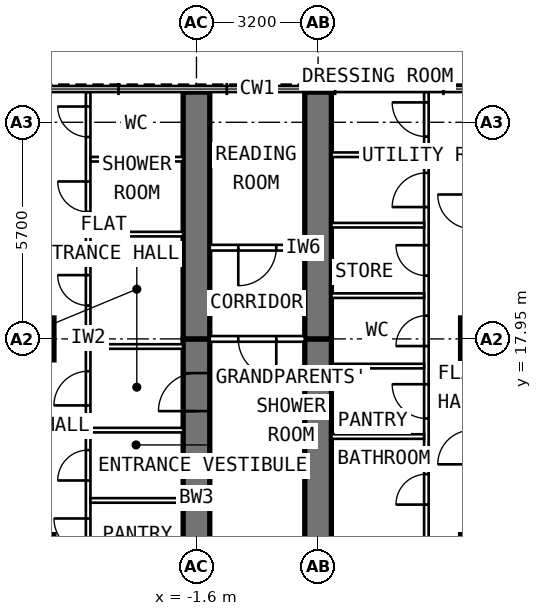
"""IFC4 building model, lengths in metres.
Left out: names, types, materials, properties, quantities, classifications, styles, units other than length and angle.
Written with IfcOpenShell. Run it as: python <this file> out.ifc"""

import sys

from ifc_helpers import new_model, si_unit, direction, frame, frame_2d, origin, origin_2d, place, context, subcontext, project, spatial, rectangle, extrude, element, fill, save


model = new_model("IFC4")
c1 = context("Model", 3, precision=1e-05, world=origin(), true_north=direction((0.0, 1.0)))
c2 = subcontext(c1, "Body", "Model", "MODEL_VIEW")
j1 = project(units=[si_unit("LENGTHUNIT", "METRE"), si_unit("PLANEANGLEUNIT", "RADIAN")], contexts=[c1])
p1 = place(None, origin())
s1 = spatial("IfcSite", under=j1, at=p1, CompositionType="ELEMENT")
p2 = place(p1, origin())
s2 = spatial("IfcBuilding", under=s1, at=p2, CompositionType="ELEMENT")
p3 = place(p2, frame((0.0, 0.0, 242.4)))
s3 = spatial("IfcBuildingStorey", under=s2, at=p3, CompositionType="ELEMENT", Elevation=242.4)
for number, where, z_axis, x_axis in (
    (1, (-5.9, 12.25, 0.0), (0.0, 0.0, 1.0), (0.0, 1.0, 0.0)),
    (2, (-5.9, 17.95, 0.0), (0.0, 0.0, 1.0), (0.0, 1.0, 0.0)),
    (3, (5.9, 12.25, 0.0), (0.0, 0.0, 1.0), (0.0, 1.0, 0.0)),
    (4, (5.9, 17.95, 0.0), (0.0, 0.0, 1.0), (0.0, 1.0, 0.0)),
):
    element("IfcColumn", number, at=place(p3, frame(where, z_axis=z_axis, x_axis=x_axis)), inside=s3, PredefinedType="COLUMN", context=c2, shape_type="SweptSolid", body=[
        extrude(rectangle(XDim=1.1, YDim=1.1, at=origin_2d()), origin(), (0.0, 0.0, 1.0), 3.6),
    ])
p4 = place(p3, frame((-1.6, 9.6, 0.0), z_axis=(0.0, 0.0, 1.0), x_axis=(0.0, 1.0, 0.0)))
e5 = element("IfcWall", 5, at=p4, inside=s3, PredefinedType="SHEAR", context=c2, shape_type="SweptSolid", body=[
    extrude(rectangle(XDim=8.35, YDim=0.7, at=frame_2d((4.175, 0.0))), origin(), (0.0, 0.0, 1.0), 3.6),
])
p5 = place(p4, frame((6.45, 0.0, 0.0)))
e6 = element("IfcOpeningElement", 6, at=p5, cuts=e5, PredefinedType="OPENING", context=c2, shape_type="SweptSolid", body=[
    extrude(rectangle(XDim=1.0, YDim=2.1, at=frame_2d((0.5, 1.05))), frame((0.0, 0.362, 0.0), z_axis=(0.0, -1.0, 0.0), x_axis=(1.0, 0.0, 0.0)), (0.0, 0.0, 1.0), 0.724),
])
p6 = place(p3, frame((-1.6, 17.95, 0.0), z_axis=(0.0, 0.0, 1.0), x_axis=(0.0, 1.0, 0.0)))
e7 = element("IfcWall", 7, at=p6, inside=s3, PredefinedType="SHEAR", context=c2, shape_type="SweptSolid", body=[
    extrude(rectangle(XDim=6.495, YDim=0.7, at=frame_2d((3.248, 0.0))), origin(), (0.0, 0.0, 1.0), 3.6),
])
p7 = place(p3, frame((1.6, 9.6, 0.0), z_axis=(0.0, 0.0, 1.0), x_axis=(0.0, 1.0, 0.0)))
e8 = element("IfcWall", 8, at=p7, inside=s3, PredefinedType="SHEAR", context=c2, shape_type="SweptSolid", body=[
    extrude(rectangle(XDim=8.35, YDim=0.7, at=frame_2d((4.175, 0.0))), origin(), (0.0, 0.0, 1.0), 3.6),
])
p8 = place(p7, frame((1.3, 0.0, 0.0)))
e9 = element("IfcOpeningElement", 9, at=p8, cuts=e8, PredefinedType="OPENING", context=c2, shape_type="SweptSolid", body=[
    extrude(rectangle(XDim=1.0, YDim=2.1, at=frame_2d((0.5, 1.05))), frame((0.0, 0.362, 0.0), z_axis=(0.0, -1.0, 0.0), x_axis=(1.0, 0.0, 0.0)), (0.0, 0.0, 1.0), 0.724),
])
p9 = place(p3, frame((1.6, 17.95, 0.0), z_axis=(0.0, 0.0, 1.0), x_axis=(0.0, 1.0, 0.0)))
e10 = element("IfcWall", 10, at=p9, inside=s3, PredefinedType="SHEAR", context=c2, shape_type="SweptSolid", body=[
    extrude(rectangle(XDim=6.495, YDim=0.7, at=frame_2d((3.248, 0.0))), origin(), (0.0, 0.0, 1.0), 3.6),
])
p10 = place(p3, frame((-4.45, 9.9, 0.0), z_axis=(0.0, 0.0, 1.0), x_axis=(0.0, 1.0, 0.0)))
e11 = element("IfcWall", 11, at=p10, inside=s3, PredefinedType="PARTITIONING", context=c2, shape_type="SweptSolid", body=[
    extrude(rectangle(XDim=14.545, YDim=0.12, at=frame_2d((7.272, 0.0))), origin(), (0.0, 0.0, 1.0), 3.35),
])
p11 = place(p10, frame((0.625, 0.0, 0.0)))
e12 = element("IfcOpeningElement", 12, at=p11, cuts=e11, PredefinedType="OPENING", context=c2, shape_type="SweptSolid", body=[
    extrude(rectangle(XDim=0.8, YDim=2.1, at=frame_2d((0.4, 1.05))), frame((0.0, 0.072, 0.0), z_axis=(0.0, -1.0, 0.0), x_axis=(1.0, 0.0, 0.0)), (0.0, 0.0, 1.0), 0.144),
])
p12 = place(p10, frame((2.425, 0.0, 0.0)))
e13 = element("IfcOpeningElement", 13, at=p12, cuts=e11, PredefinedType="OPENING", context=c2, shape_type="SweptSolid", body=[
    extrude(rectangle(XDim=0.9, YDim=2.1, at=frame_2d((0.45, 1.05))), frame((0.0, 0.072, 0.0), z_axis=(0.0, -1.0, 0.0), x_axis=(1.0, 0.0, 0.0)), (0.0, 0.0, 1.0), 0.144),
])
p13 = place(p10, frame((4.325, 0.0, 0.0)))
e14 = element("IfcOpeningElement", 14, at=p13, cuts=e11, PredefinedType="OPENING", context=c2, shape_type="SweptSolid", body=[
    extrude(rectangle(XDim=0.8, YDim=2.1, at=frame_2d((0.4, 1.05))), frame((0.0, 0.072, 0.0), z_axis=(0.0, -1.0, 0.0), x_axis=(1.0, 0.0, 0.0)), (0.0, 0.0, 1.0), 0.144),
])
p14 = place(p10, frame((6.3, 0.0, 0.0)))
e15 = element("IfcOpeningElement", 15, at=p14, cuts=e11, PredefinedType="OPENING", context=c2, shape_type="SweptSolid", body=[
    extrude(rectangle(XDim=0.9, YDim=2.1, at=frame_2d((0.45, 1.05))), frame((0.0, 0.072, 0.0), z_axis=(0.0, -1.0, 0.0), x_axis=(1.0, 0.0, 0.0)), (0.0, 0.0, 1.0), 0.144),
])
p15 = place(p10, frame((8.928, 0.0, 0.0)))
e16 = element("IfcOpeningElement", 16, at=p15, cuts=e11, PredefinedType="OPENING", context=c2, shape_type="SweptSolid", body=[
    extrude(rectangle(XDim=0.8, YDim=2.1, at=frame_2d((0.4, 1.05))), frame((0.0, 0.072, 0.0), z_axis=(0.0, -1.0, 0.0), x_axis=(1.0, 0.0, 0.0)), (0.0, 0.0, 1.0), 0.144),
])
p16 = place(p10, frame((11.393, 0.0, 0.0)))
e17 = element("IfcOpeningElement", 17, at=p16, cuts=e11, PredefinedType="OPENING", context=c2, shape_type="SweptSolid", body=[
    extrude(rectangle(XDim=0.8, YDim=2.1, at=frame_2d((0.4, 1.05))), frame((0.0, 0.072, 0.0), z_axis=(0.0, -1.0, 0.0), x_axis=(1.0, 0.0, 0.0)), (0.0, 0.0, 1.0), 0.144),
])
p17 = place(p10, frame((13.364, 0.0, 0.0)))
e18 = element("IfcOpeningElement", 18, at=p17, cuts=e11, PredefinedType="OPENING", context=c2, shape_type="SweptSolid", body=[
    extrude(rectangle(XDim=0.8, YDim=2.1, at=frame_2d((0.4, 1.05))), frame((0.0, 0.072, 0.0), z_axis=(0.0, -1.0, 0.0), x_axis=(1.0, 0.0, 0.0)), (0.0, 0.0, 1.0), 0.144),
])
for number, where, z_axis, x_axis in (
    (19, (-1.95, 13.7, 0.0), (0.0, 0.0, 1.0), (-1.0, 0.0, 0.0)),
    (20, (-1.95, 15.55, 0.0), (0.0, 0.0, 1.0), (-1.0, 0.0, 0.0)),
):
    element("IfcWall", number, at=place(p3, frame(where, z_axis=z_axis, x_axis=x_axis)), inside=s3, PredefinedType="PARTITIONING", context=c2, shape_type="SweptSolid", body=[
        extrude(rectangle(XDim=2.44, YDim=0.12, at=frame_2d((1.22, 0.0))), origin(), (0.0, 0.0, 1.0), 3.35),
    ])
p18 = place(p3, frame((-1.95, 17.75, 0.0), z_axis=(0.0, 0.0, 1.0), x_axis=(-1.0, 0.0, 0.0)))
e21 = element("IfcWall", 21, at=p18, inside=s3, PredefinedType="PARTITIONING", context=c2, shape_type="SweptSolid", body=[
    extrude(rectangle(XDim=2.44, YDim=0.12, at=frame_2d((1.22, 0.0))), origin(), (0.0, 0.0, 1.0), 2.45),
])
for number, where, z_axis, x_axis in (
    (22, (-1.95, 20.707, 0.0), (0.0, 0.0, 1.0), (-1.0, 0.0, 0.0)),
    (23, (-1.95, 22.678, 0.0), (0.0, 0.0, 1.0), (-1.0, 0.0, 0.0)),
):
    element("IfcWall", number, at=place(p3, frame(where, z_axis=z_axis, x_axis=x_axis)), inside=s3, PredefinedType="PARTITIONING", context=c2, shape_type="SweptSolid", body=[
        extrude(rectangle(XDim=2.44, YDim=0.12, at=frame_2d((1.22, 0.0))), origin(), (0.0, 0.0, 1.0), 3.35),
    ])
p19 = place(p3, frame((4.45, 9.9, 0.0), z_axis=(0.0, 0.0, 1.0), x_axis=(0.0, 1.0, 0.0)))
e24 = element("IfcWall", 24, at=p19, inside=s3, PredefinedType="PARTITIONING", context=c2, shape_type="SweptSolid", body=[
    extrude(rectangle(XDim=14.545, YDim=0.12, at=frame_2d((7.272, 0.0))), origin(), (0.0, 0.0, 1.0), 3.35),
])
p20 = place(p19, frame((0.95, 0.0, 0.0)))
e25 = element("IfcOpeningElement", 25, at=p20, cuts=e24, PredefinedType="OPENING", context=c2, shape_type="SweptSolid", body=[
    extrude(rectangle(XDim=0.9, YDim=2.1, at=frame_2d((0.45, 1.05))), frame((0.0, 0.072, 0.0), z_axis=(0.0, -1.0, 0.0), x_axis=(1.0, 0.0, 0.0)), (0.0, 0.0, 1.0), 0.144),
])
p21 = place(p19, frame((3.69, 0.0, 0.0)))
e26 = element("IfcOpeningElement", 26, at=p21, cuts=e24, PredefinedType="OPENING", context=c2, shape_type="SweptSolid", body=[
    extrude(rectangle(XDim=0.8, YDim=2.1, at=frame_2d((0.4, 1.05))), frame((0.0, 0.072, 0.0), z_axis=(0.0, -1.0, 0.0), x_axis=(1.0, 0.0, 0.0)), (0.0, 0.0, 1.0), 0.144),
])
p22 = place(p19, frame((5.958, 0.0, 0.0)))
e27 = element("IfcOpeningElement", 27, at=p22, cuts=e24, PredefinedType="OPENING", context=c2, shape_type="SweptSolid", body=[
    extrude(rectangle(XDim=0.9, YDim=2.1, at=frame_2d((0.45, 1.05))), frame((0.0, 0.072, 0.0), z_axis=(0.0, -1.0, 0.0), x_axis=(1.0, 0.0, 0.0)), (0.0, 0.0, 1.0), 0.144),
])
p23 = place(p19, frame((7.862, 0.0, 0.0)))
e28 = element("IfcOpeningElement", 28, at=p23, cuts=e24, PredefinedType="OPENING", context=c2, shape_type="SweptSolid", body=[
    extrude(rectangle(XDim=0.8, YDim=2.1, at=frame_2d((0.4, 1.05))), frame((0.0, 0.072, 0.0), z_axis=(0.0, -1.0, 0.0), x_axis=(1.0, 0.0, 0.0)), (0.0, 0.0, 1.0), 0.144),
])
p24 = place(p19, frame((9.715, 0.0, 0.0)))
e29 = element("IfcOpeningElement", 29, at=p24, cuts=e24, PredefinedType="OPENING", context=c2, shape_type="SweptSolid", body=[
    extrude(rectangle(XDim=0.8, YDim=2.1, at=frame_2d((0.4, 1.05))), frame((0.0, 0.072, 0.0), z_axis=(0.0, -1.0, 0.0), x_axis=(1.0, 0.0, 0.0)), (0.0, 0.0, 1.0), 0.144),
])
p25 = place(p19, frame((11.519, 0.0, 0.0)))
e30 = element("IfcOpeningElement", 30, at=p25, cuts=e24, PredefinedType="OPENING", context=c2, shape_type="SweptSolid", body=[
    extrude(rectangle(XDim=0.9, YDim=2.1, at=frame_2d((0.45, 1.05))), frame((0.0, 0.072, 0.0), z_axis=(0.0, -1.0, 0.0), x_axis=(1.0, 0.0, 0.0)), (0.0, 0.0, 1.0), 0.144),
])
p26 = place(p19, frame((13.373, 0.0, 0.0)))
e31 = element("IfcOpeningElement", 31, at=p26, cuts=e24, PredefinedType="OPENING", context=c2, shape_type="SweptSolid", body=[
    extrude(rectangle(XDim=0.9, YDim=2.1, at=frame_2d((0.45, 1.05))), frame((0.0, 0.072, 0.0), z_axis=(0.0, -1.0, 0.0), x_axis=(1.0, 0.0, 0.0)), (0.0, 0.0, 1.0), 0.144),
])
for number, where, z_axis, x_axis in (
    (32, (1.95, 15.381, 0.0), (0.0, 0.0, 1.0), (1.0, 0.0, 0.0)),
    (33, (1.95, 17.235, 0.0), (0.0, 0.0, 1.0), (1.0, 0.0, 0.0)),
    (34, (1.95, 19.088, 0.0), (0.0, 0.0, 1.0), (1.0, 0.0, 0.0)),
    (35, (1.95, 20.942, 0.0), (0.0, 0.0, 1.0), (1.0, 0.0, 0.0)),
    (36, (1.95, 22.796, 0.0), (0.0, 0.0, 1.0), (1.0, 0.0, 0.0)),
):
    element("IfcWall", number, at=place(p3, frame(where, z_axis=z_axis, x_axis=x_axis)), inside=s3, PredefinedType="PARTITIONING", context=c2, shape_type="SweptSolid", body=[
        extrude(rectangle(XDim=2.44, YDim=0.12, at=frame_2d((1.22, 0.0))), origin(), (0.0, 0.0, 1.0), 3.35),
    ])
p27 = place(p3, frame((1.25, 20.35, 0.0), z_axis=(0.0, 0.0, 1.0), x_axis=(-1.0, 0.0, 0.0)))
e37 = element("IfcWall", 37, at=p27, inside=s3, PredefinedType="PARTITIONING", context=c2, shape_type="SweptSolid", body=[
    extrude(rectangle(XDim=2.5, YDim=0.15, at=frame_2d((1.25, 0.0))), origin(), (0.0, 0.0, 1.0), 3.35),
])
p28 = place(p27, frame((0.75, 0.0, 0.0)))
e38 = element("IfcOpeningElement", 38, at=p28, cuts=e37, PredefinedType="OPENING", context=c2, shape_type="SweptSolid", body=[
    extrude(rectangle(XDim=1.0, YDim=2.1, at=frame_2d((0.5, 1.05))), frame((0.0, 0.087, 0.0), z_axis=(0.0, -1.0, 0.0), x_axis=(1.0, 0.0, 0.0)), (0.0, 0.0, 1.0), 0.174),
])
p29 = place(p3, frame((1.25, 17.95, 0.0), z_axis=(0.0, 0.0, 1.0), x_axis=(-1.0, 0.0, 0.0)))
e39 = element("IfcWall", 39, at=p29, inside=s3, PredefinedType="PARTITIONING", context=c2, shape_type="SweptSolid", body=[
    extrude(rectangle(XDim=2.5, YDim=0.15, at=frame_2d((1.25, 0.0))), origin(), (0.0, 0.0, 1.0), 3.35),
])
p30 = place(p29, frame((0.75, 0.0, 0.0)))
e40 = element("IfcOpeningElement", 40, at=p30, cuts=e39, PredefinedType="OPENING", context=c2, shape_type="SweptSolid", body=[
    extrude(rectangle(XDim=1.0, YDim=2.1, at=frame_2d((0.5, 1.05))), frame((0.0, 0.087, 0.0), z_axis=(0.0, -1.0, 0.0), x_axis=(1.0, 0.0, 0.0)), (0.0, 0.0, 1.0), 0.174),
])
p31 = place(p5, origin())
e41 = element("IfcDoor", 41, at=p31, inside=s3, OperationType="SINGLE_SWING_LEFT", PredefinedType="DOOR", context=c2, shape_type="SweptSolid", body=[
    extrude(rectangle(XDim=1.0, YDim=2.1, at=frame_2d((0.5, 1.05))), frame((0.0, 0.1, 0.0), z_axis=(0.0, -1.0, 0.0), x_axis=(1.0, 0.0, 0.0)), (0.0, 0.0, 1.0), 0.2),
])
fill(e6, e41)
p32 = place(p12, origin())
e42 = element("IfcDoor", 42, at=p32, inside=s3, OperationType="SINGLE_SWING_RIGHT", PredefinedType="DOOR", context=c2, shape_type="SweptSolid", body=[
    extrude(rectangle(XDim=0.9, YDim=2.1, at=frame_2d((0.45, 1.05))), frame((0.0, 0.025, 0.0), z_axis=(0.0, -1.0, 0.0), x_axis=(1.0, 0.0, 0.0)), (0.0, 0.0, 1.0), 0.05),
])
fill(e13, e42)
p33 = place(p13, origin())
e43 = element("IfcDoor", 43, at=p33, inside=s3, OperationType="SINGLE_SWING_LEFT", PredefinedType="DOOR", context=c2, shape_type="SweptSolid", body=[
    extrude(rectangle(XDim=0.8, YDim=2.1, at=frame_2d((0.4, 1.05))), frame((0.0, 0.025, 0.0), z_axis=(0.0, -1.0, 0.0), x_axis=(1.0, 0.0, 0.0)), (0.0, 0.0, 1.0), 0.05),
])
fill(e14, e43)
p34 = place(p14, origin())
e44 = element("IfcDoor", 44, at=p34, inside=s3, OperationType="SINGLE_SWING_LEFT", PredefinedType="DOOR", context=c2, shape_type="SweptSolid", body=[
    extrude(rectangle(XDim=0.9, YDim=2.1, at=frame_2d((0.45, 1.05))), frame((0.0, 0.025, 0.0), z_axis=(0.0, -1.0, 0.0), x_axis=(1.0, 0.0, 0.0)), (0.0, 0.0, 1.0), 0.05),
])
fill(e15, e44)
p35 = place(p15, origin())
e45 = element("IfcDoor", 45, at=p35, inside=s3, OperationType="SINGLE_SWING_RIGHT", PredefinedType="DOOR", context=c2, shape_type="SweptSolid", body=[
    extrude(rectangle(XDim=0.8, YDim=2.1, at=frame_2d((0.4, 1.05))), frame((0.0, 0.025, 0.0), z_axis=(0.0, -1.0, 0.0), x_axis=(1.0, 0.0, 0.0)), (0.0, 0.0, 1.0), 0.05),
])
fill(e16, e45)
p36 = place(p16, origin())
e46 = element("IfcDoor", 46, at=p36, inside=s3, OperationType="SINGLE_SWING_RIGHT", PredefinedType="DOOR", context=c2, shape_type="SweptSolid", body=[
    extrude(rectangle(XDim=0.8, YDim=2.1, at=frame_2d((0.4, 1.05))), frame((0.0, 0.025, 0.0), z_axis=(0.0, -1.0, 0.0), x_axis=(1.0, 0.0, 0.0)), (0.0, 0.0, 1.0), 0.05),
])
fill(e17, e46)
p37 = place(p17, origin())
e47 = element("IfcDoor", 47, at=p37, inside=s3, OperationType="SINGLE_SWING_RIGHT", PredefinedType="DOOR", context=c2, shape_type="SweptSolid", body=[
    extrude(rectangle(XDim=0.8, YDim=2.1, at=frame_2d((0.4, 1.05))), frame((0.0, 0.025, 0.0), z_axis=(0.0, -1.0, 0.0), x_axis=(1.0, 0.0, 0.0)), (0.0, 0.0, 1.0), 0.05),
])
fill(e18, e47)
p38 = place(p21, origin())
e48 = element("IfcDoor", 48, at=p38, inside=s3, OperationType="SINGLE_SWING_LEFT", PredefinedType="DOOR", context=c2, shape_type="SweptSolid", body=[
    extrude(rectangle(XDim=0.8, YDim=2.1, at=frame_2d((0.4, 1.05))), frame((0.0, 0.025, 0.0), z_axis=(0.0, -1.0, 0.0), x_axis=(1.0, 0.0, 0.0)), (0.0, 0.0, 1.0), 0.05),
])
fill(e26, e48)
p39 = place(p22, origin())
e49 = element("IfcDoor", 49, at=p39, inside=s3, OperationType="SINGLE_SWING_RIGHT", PredefinedType="DOOR", context=c2, shape_type="SweptSolid", body=[
    extrude(rectangle(XDim=0.9, YDim=2.1, at=frame_2d((0.45, 1.05))), frame((0.0, 0.025, 0.0), z_axis=(0.0, -1.0, 0.0), x_axis=(1.0, 0.0, 0.0)), (0.0, 0.0, 1.0), 0.05),
])
fill(e27, e49)
p40 = place(p23, origin())
e50 = element("IfcDoor", 50, at=p40, inside=s3, OperationType="SINGLE_SWING_LEFT", PredefinedType="DOOR", context=c2, shape_type="SweptSolid", body=[
    extrude(rectangle(XDim=0.8, YDim=2.1, at=frame_2d((0.4, 1.05))), frame((0.0, 0.025, 0.0), z_axis=(0.0, -1.0, 0.0), x_axis=(1.0, 0.0, 0.0)), (0.0, 0.0, 1.0), 0.05),
])
fill(e28, e50)
p41 = place(p24, origin())
e51 = element("IfcDoor", 51, at=p41, inside=s3, OperationType="SINGLE_SWING_RIGHT", PredefinedType="DOOR", context=c2, shape_type="SweptSolid", body=[
    extrude(rectangle(XDim=0.8, YDim=2.1, at=frame_2d((0.4, 1.05))), frame((0.0, 0.025, 0.0), z_axis=(0.0, -1.0, 0.0), x_axis=(1.0, 0.0, 0.0)), (0.0, 0.0, 1.0), 0.05),
])
fill(e29, e51)
p42 = place(p25, origin())
e52 = element("IfcDoor", 52, at=p42, inside=s3, OperationType="SINGLE_SWING_LEFT", PredefinedType="DOOR", context=c2, shape_type="SweptSolid", body=[
    extrude(rectangle(XDim=0.9, YDim=2.1, at=frame_2d((0.45, 1.05))), frame((0.0, 0.025, 0.0), z_axis=(0.0, -1.0, 0.0), x_axis=(1.0, 0.0, 0.0)), (0.0, 0.0, 1.0), 0.05),
])
fill(e30, e52)
p43 = place(p26, origin())
e53 = element("IfcDoor", 53, at=p43, inside=s3, OperationType="SINGLE_SWING_RIGHT", PredefinedType="DOOR", context=c2, shape_type="SweptSolid", body=[
    extrude(rectangle(XDim=0.9, YDim=2.1, at=frame_2d((0.45, 1.05))), frame((0.0, 0.025, 0.0), z_axis=(0.0, -1.0, 0.0), x_axis=(1.0, 0.0, 0.0)), (0.0, 0.0, 1.0), 0.05),
])
fill(e31, e53)
p44 = place(p28, origin())
e54 = element("IfcDoor", 54, at=p44, inside=s3, OperationType="SINGLE_SWING_RIGHT", PredefinedType="DOOR", context=c2, shape_type="SweptSolid", body=[
    extrude(rectangle(XDim=1.0, YDim=2.1, at=frame_2d((0.5, 1.05))), frame((0.0, 0.025, 0.0), z_axis=(0.0, -1.0, 0.0), x_axis=(1.0, 0.0, 0.0)), (0.0, 0.0, 1.0), 0.05),
])
fill(e38, e54)
p45 = place(p30, origin())
e55 = element("IfcDoor", 55, at=p45, inside=s3, OperationType="SINGLE_SWING_LEFT", PredefinedType="DOOR", context=c2, shape_type="SweptSolid", body=[
    extrude(rectangle(XDim=1.0, YDim=2.1, at=frame_2d((0.5, 1.05))), frame((0.0, 0.025, 0.0), z_axis=(0.0, -1.0, 0.0), x_axis=(1.0, 0.0, 0.0)), (0.0, 0.0, 1.0), 0.05),
])
fill(e40, e55)
save(model, sys.argv[1])
